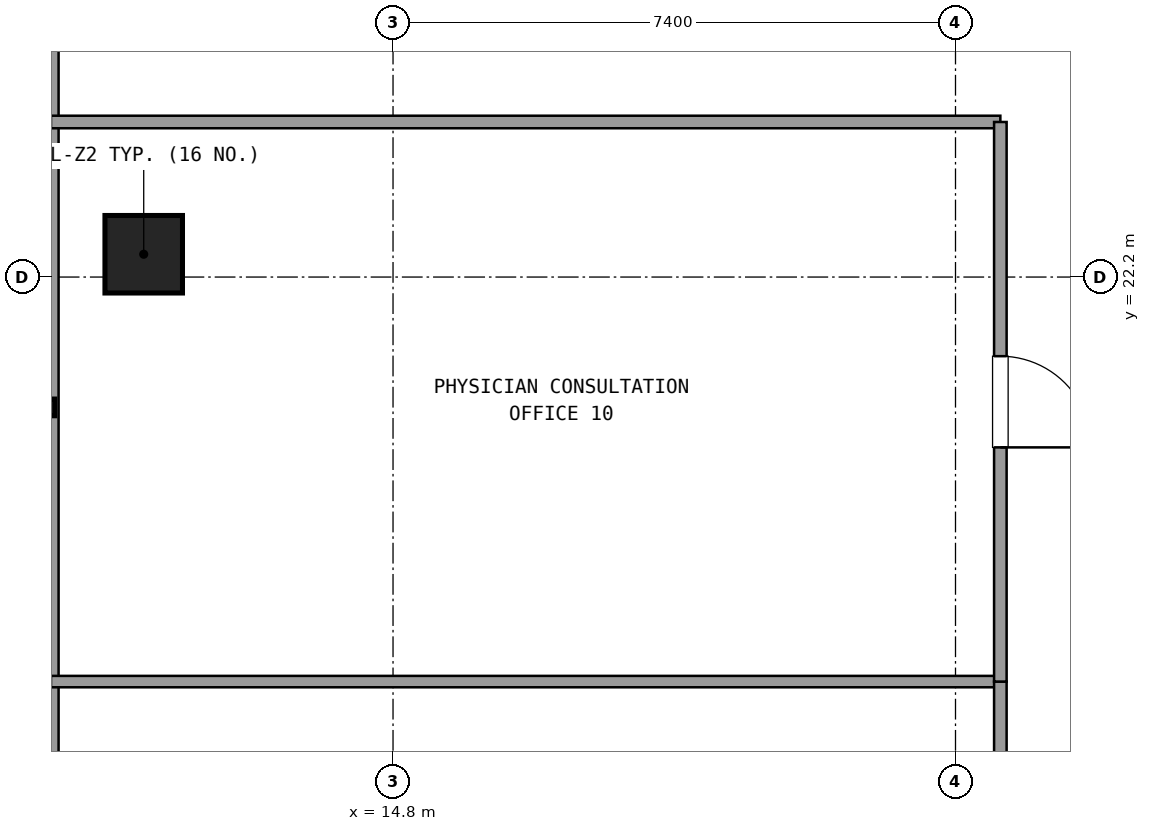
"""IFC4 building model, lengths in metres.
Left out: names, types, materials, properties, quantities, classifications, styles, units other than length and angle.
Written with IfcOpenShell. Run it as: python <this file> out.ifc"""

import sys

from ifc_helpers import new_model, si_unit, direction, frame, frame_2d, origin, origin_2d, place, context, subcontext, project, spatial, rectangle, extrude, element, fill, save


model = new_model("IFC4")
c1 = context("Model", 3, precision=1e-05, world=origin(), true_north=direction((0.0, 1.0)))
c2 = subcontext(c1, "Body", "Model", "MODEL_VIEW")
j1 = project(units=[si_unit("LENGTHUNIT", "METRE"), si_unit("PLANEANGLEUNIT", "RADIAN")], contexts=[c1])
p1 = place(None, origin())
s1 = spatial("IfcSite", under=j1, at=p1, CompositionType="ELEMENT")
p2 = place(p1, origin())
s2 = spatial("IfcBuilding", under=s1, at=p2, CompositionType="ELEMENT")
p3 = place(p2, frame((0.0, 0.0, 81.18)))
s3 = spatial("IfcBuildingStorey", under=s2, at=p3, CompositionType="ELEMENT", Elevation=81.18)
p4 = place(p3, frame((11.52, 22.5, 0.0), z_axis=(0.0, 0.0, 1.0), x_axis=(1.0, 0.0, 0.0)))
e1 = element("IfcColumn", 1, at=p4, inside=s3, PredefinedType="COLUMN", context=c2, shape_type="SweptSolid", body=[
    extrude(rectangle(XDim=1.02, YDim=1.02, at=origin_2d()), origin(), (0.0, 0.0, 1.0), 3.6),
])
p5 = place(p3, frame((10.28, 42.145, 0.0), z_axis=(0.0, 0.0, 1.0), x_axis=(0.0, -1.0, 0.0)))
e2 = element("IfcWall", 2, at=p5, inside=s3, PredefinedType="SOLIDWALL", context=c2, shape_type="SweptSolid", body=[
    extrude(rectangle(XDim=32.49, YDim=0.24, at=frame_2d((16.245, 0.0))), origin(), (0.0, 0.0, 1.0), 0.85),
])
p6 = place(p3, frame((10.3, 24.24, 0.0), z_axis=(0.0, 0.0, 1.0), x_axis=(1.0, 0.0, 0.0)))
e3 = element("IfcWall", 3, at=p6, inside=s3, PredefinedType="PARTITIONING", context=c2, shape_type="SweptSolid", body=[
    extrude(rectangle(XDim=12.49, YDim=0.165, at=frame_2d((6.245, 0.0))), origin(), (0.0, 0.0, 1.0), 2.61),
])
p7 = place(p3, frame((22.79, 16.878, 0.0), z_axis=(0.0, 0.0, 1.0), x_axis=(-1.0, 0.0, 0.0)))
e4 = element("IfcWall", 4, at=p7, inside=s3, PredefinedType="PARTITIONING", context=c2, shape_type="SweptSolid", body=[
    extrude(rectangle(XDim=12.49, YDim=0.15, at=frame_2d((6.245, 0.0))), origin(), (0.0, 0.0, 1.0), 2.61),
])
p8 = place(p3, frame((22.79, 11.094, 0.0), z_axis=(0.0, 0.0, 1.0), x_axis=(0.0, 1.0, 0.0)))
e5 = element("IfcWall", 5, at=p8, inside=s3, PredefinedType="PARTITIONING", context=c2, shape_type="SweptSolid", body=[
    extrude(rectangle(XDim=5.784, YDim=0.165, at=frame_2d((2.892, 0.0))), origin(), (0.0, 0.0, 1.0), 2.61),
])
p9 = place(p8, frame((2.292, 0.0, 0.0)))
e6 = element("IfcOpeningElement", 6, at=p9, cuts=e5, PredefinedType="OPENING", context=c2, shape_type="SweptSolid", body=[
    extrude(rectangle(XDim=1.2, YDim=2.15, at=frame_2d((0.6, 1.075))), frame((0.0, 0.093, 0.0), z_axis=(0.0, -1.0, 0.0), x_axis=(1.0, 0.0, 0.0)), (0.0, 0.0, 1.0), 0.185),
])
p10 = place(p3, frame((22.79, 16.878, 0.0), z_axis=(0.0, 0.0, 1.0), x_axis=(0.0, 1.0, 0.0)))
e7 = element("IfcWall", 7, at=p10, inside=s3, PredefinedType="PARTITIONING", context=c2, shape_type="SweptSolid", body=[
    extrude(rectangle(XDim=7.362, YDim=0.165, at=frame_2d((3.681, 0.0))), origin(), (0.0, 0.0, 1.0), 2.61),
])
p11 = place(p10, frame((3.081, 0.0, 0.0)))
e8 = element("IfcOpeningElement", 8, at=p11, cuts=e7, PredefinedType="OPENING", context=c2, shape_type="SweptSolid", body=[
    extrude(rectangle(XDim=1.2, YDim=2.15, at=frame_2d((0.6, 1.075))), frame((0.0, 0.093, 0.0), z_axis=(0.0, -1.0, 0.0), x_axis=(1.0, 0.0, 0.0)), (0.0, 0.0, 1.0), 0.185),
])
p12 = place(p11, frame((1.2, 0.0, 0.0), z_axis=(0.0, 0.0, 1.0), x_axis=(-1.0, 0.0, 0.0)))
e9 = element("IfcDoor", 9, at=p12, inside=s3, OperationType="SINGLE_SWING_LEFT", PredefinedType="DOOR", context=c2, shape_type="SweptSolid", body=[
    extrude(rectangle(XDim=1.2, YDim=2.15, at=frame_2d((0.6, 1.075))), frame((0.0, 0.025, 0.0), z_axis=(0.0, -1.0, 0.0), x_axis=(1.0, 0.0, 0.0)), (0.0, 0.0, 1.0), 0.05),
])
fill(e8, e9)
save(model, sys.argv[1])
